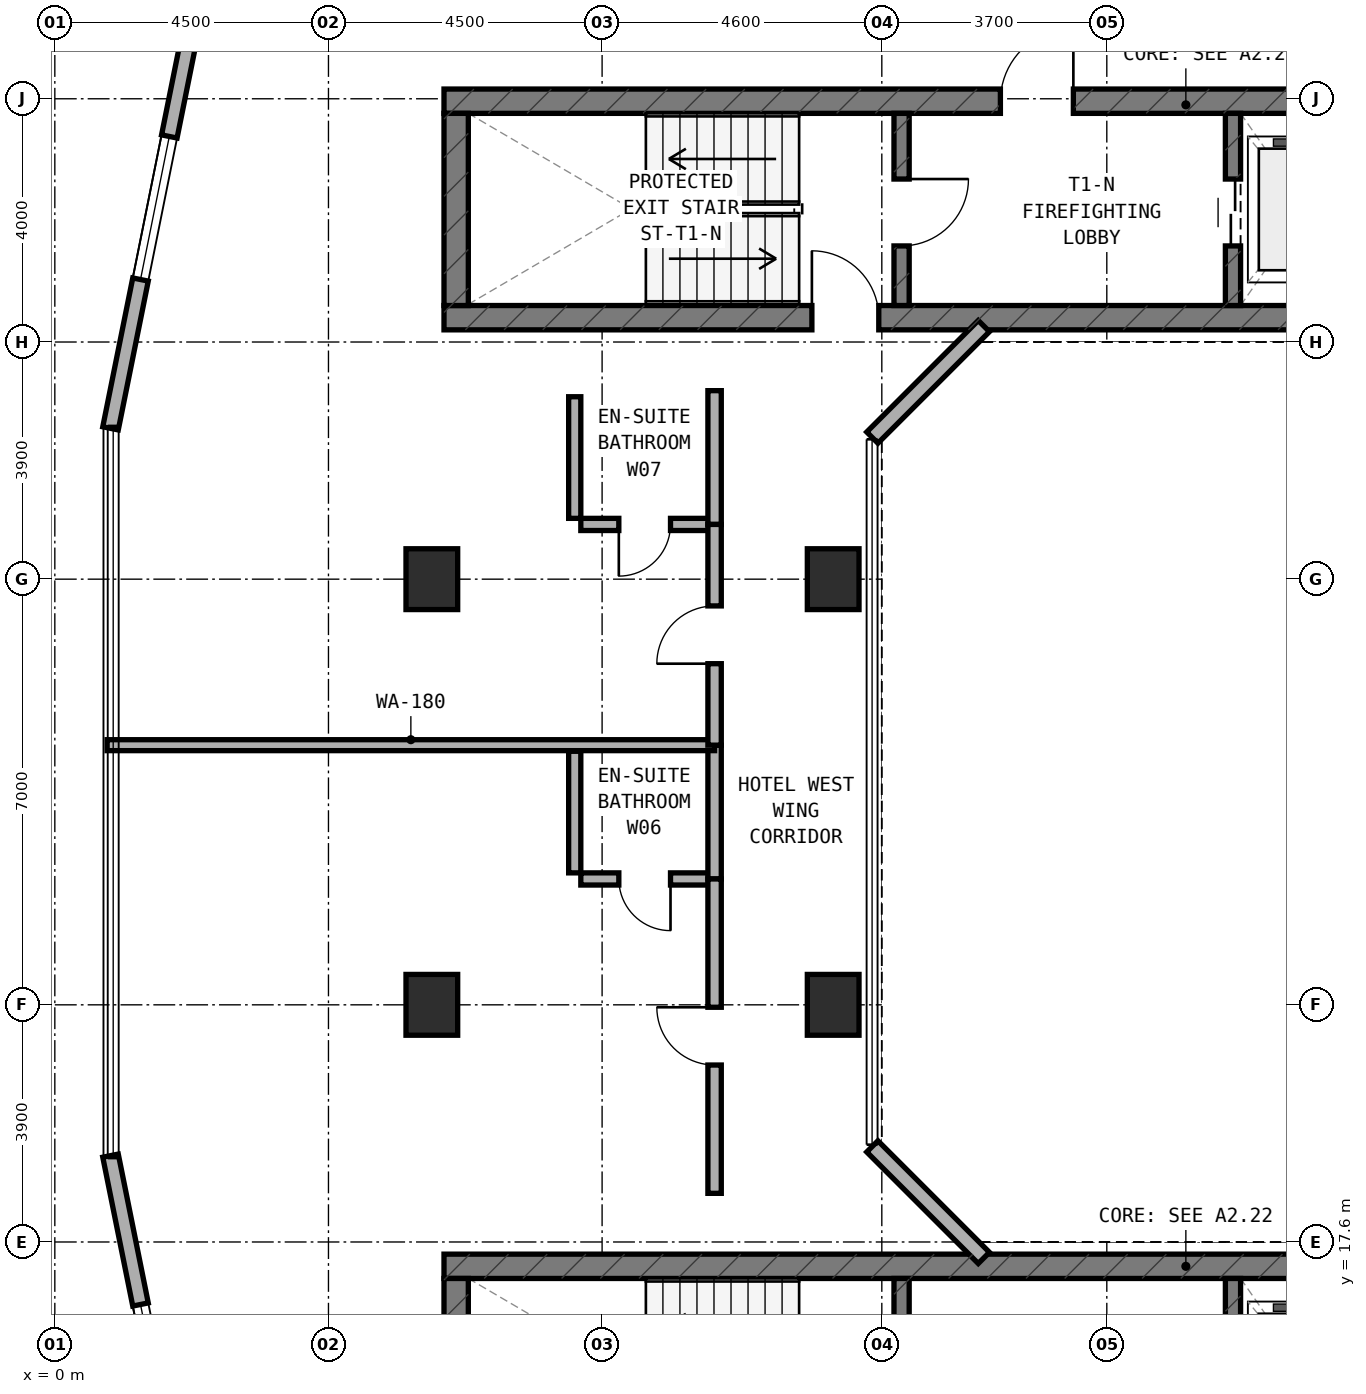
"""IFC4 building model, lengths in metres.
Left out: names, types, materials, properties, quantities, classifications, styles, units other than length and angle.
Written with IfcOpenShell. Run it as: python <this file> out.ifc"""

import sys

from ifc_helpers import new_model, si_unit, direction, frame, frame_2d, origin, origin_2d, place, context, subcontext, project, spatial, rectangle, extrude, element, fill, save


model = new_model("IFC4")
c1 = context("Model", 3, precision=1e-05, world=origin(), true_north=direction((0.0, 1.0)))
c2 = subcontext(c1, "Body", "Model", "MODEL_VIEW")
j1 = project(units=[si_unit("LENGTHUNIT", "METRE"), si_unit("PLANEANGLEUNIT", "RADIAN")], contexts=[c1])
p1 = place(None, origin())
s1 = spatial("IfcSite", under=j1, at=p1, CompositionType="ELEMENT")
p2 = place(p1, origin())
s2 = spatial("IfcBuilding", under=s1, at=p2, CompositionType="ELEMENT")
p3 = place(p2, frame((0.0, 0.0, 95.0)))
s3 = spatial("IfcBuildingStorey", under=s2, at=p3, CompositionType="ELEMENT", Elevation=95.0)
p4 = place(p3, frame((6.4, 32.8, 0.0), z_axis=(0.0, 0.0, 1.0), x_axis=(1.0, 0.0, 0.0)))
e1 = element("IfcWall", 1, at=p4, inside=s3, PredefinedType="SHEAR", context=c2, shape_type="SweptSolid", body=[
    extrude(rectangle(XDim=24.4, YDim=0.4, at=frame_2d((12.2, 0.0))), origin(), (0.0, 0.0, 1.0), 3.5),
])
p5 = place(p4, frame((6.05, 0.0, 0.0)))
e2 = element("IfcOpeningElement", 2, at=p5, cuts=e1, PredefinedType="OPENING", context=c2, shape_type="SweptSolid", body=[
    extrude(rectangle(XDim=1.1, YDim=2.15, at=frame_2d((0.55, 1.075))), frame((0.0, 0.21, 0.0), z_axis=(0.0, -1.0, 0.0), x_axis=(1.0, 0.0, 0.0)), (0.0, 0.0, 1.0), 0.42),
])
p6 = place(p3, frame((6.4, 36.36, 0.0), z_axis=(0.0, 0.0, 1.0), x_axis=(1.0, 0.0, 0.0)))
e3 = element("IfcWall", 3, at=p6, inside=s3, PredefinedType="SHEAR", context=c2, shape_type="SweptSolid", body=[
    extrude(rectangle(XDim=24.4, YDim=0.4, at=frame_2d((12.2, 0.0))), origin(), (0.0, 0.0, 1.0), 3.5),
])
p7 = place(p6, frame((9.15, 0.0, 0.0)))
e4 = element("IfcOpeningElement", 4, at=p7, cuts=e3, PredefinedType="OPENING", context=c2, shape_type="SweptSolid", body=[
    extrude(rectangle(XDim=1.2, YDim=2.15, at=frame_2d((0.6, 1.075))), frame((0.0, 0.21, 0.0), z_axis=(0.0, -1.0, 0.0), x_axis=(1.0, 0.0, 0.0)), (0.0, 0.0, 1.0), 0.42),
])
p8 = place(p6, frame((16.94, 0.0, 0.0)))
e5 = element("IfcOpeningElement", 5, at=p8, cuts=e3, PredefinedType="OPENING", context=c2, shape_type="SweptSolid", body=[
    extrude(rectangle(XDim=0.85, YDim=2.1, at=frame_2d((0.425, 1.05))), frame((0.0, 0.21, 0.0), z_axis=(0.0, -1.0, 0.0), x_axis=(1.0, 0.0, 0.0)), (0.0, 0.0, 1.0), 0.42),
])
p9 = place(p6, frame((18.783, 0.0, 0.0)))
e6 = element("IfcOpeningElement", 6, at=p9, cuts=e3, PredefinedType="OPENING", context=c2, shape_type="SweptSolid", body=[
    extrude(rectangle(XDim=1.1, YDim=2.15, at=frame_2d((0.55, 1.075))), frame((0.0, 0.21, 0.0), z_axis=(0.0, -1.0, 0.0), x_axis=(1.0, 0.0, 0.0)), (0.0, 0.0, 1.0), 0.42),
])
p10 = place(p6, frame((20.65, 0.0, 0.0)))
e7 = element("IfcOpeningElement", 7, at=p10, cuts=e3, PredefinedType="OPENING", context=c2, shape_type="SweptSolid", body=[
    extrude(rectangle(XDim=1.1, YDim=2.15, at=frame_2d((0.55, 1.075))), frame((0.0, 0.21, 0.0), z_axis=(0.0, -1.0, 0.0), x_axis=(1.0, 0.0, 0.0)), (0.0, 0.0, 1.0), 0.42),
])
p11 = place(p6, frame((22.517, 0.0, 0.0)))
e8 = element("IfcOpeningElement", 8, at=p11, cuts=e3, PredefinedType="OPENING", context=c2, shape_type="SweptSolid", body=[
    extrude(rectangle(XDim=1.1, YDim=2.15, at=frame_2d((0.55, 1.075))), frame((0.0, 0.21, 0.0), z_axis=(0.0, -1.0, 0.0), x_axis=(1.0, 0.0, 0.0)), (0.0, 0.0, 1.0), 0.42),
])
p12 = place(p3, frame((6.6, 33.0, 0.0), z_axis=(0.0, 0.0, 1.0), x_axis=(0.0, 1.0, 0.0)))
e9 = element("IfcWall", 9, at=p12, inside=s3, PredefinedType="SHEAR", context=c2, shape_type="SweptSolid", body=[
    extrude(rectangle(XDim=3.16, YDim=0.4, at=frame_2d((1.58, 0.0))), origin(), (0.0, 0.0, 1.0), 3.5),
])
p13 = place(p3, frame((13.925, 33.0, 0.0), z_axis=(0.0, 0.0, 1.0), x_axis=(0.0, 1.0, 0.0)))
e10 = element("IfcWall", 10, at=p13, inside=s3, PredefinedType="STANDARD", context=c2, shape_type="SweptSolid", body=[
    extrude(rectangle(XDim=3.16, YDim=0.25, at=frame_2d((1.58, 0.0))), origin(), (0.0, 0.0, 1.0), 3.22),
])
p14 = place(p13, frame((0.98, 0.0, 0.0)))
e11 = element("IfcOpeningElement", 11, at=p14, cuts=e10, PredefinedType="OPENING", context=c2, shape_type="SweptSolid", body=[
    extrude(rectangle(XDim=1.1, YDim=2.15, at=frame_2d((0.55, 1.075))), frame((0.0, 0.135, 0.0), z_axis=(0.0, -1.0, 0.0), x_axis=(1.0, 0.0, 0.0)), (0.0, 0.0, 1.0), 0.27),
])
p15 = place(p3, frame((19.375, 33.0, 0.0), z_axis=(0.0, 0.0, 1.0), x_axis=(0.0, 1.0, 0.0)))
e12 = element("IfcWall", 12, at=p15, inside=s3, PredefinedType="STANDARD", context=c2, shape_type="SweptSolid", body=[
    extrude(rectangle(XDim=3.16, YDim=0.25, at=frame_2d((1.58, 0.0))), origin(), (0.0, 0.0, 1.0), 3.22),
])
p16 = place(p15, frame((0.98, 0.0, 0.0)))
e13 = element("IfcOpeningElement", 13, at=p16, cuts=e12, PredefinedType="OPENING", context=c2, shape_type="SweptSolid", body=[
    extrude(rectangle(XDim=1.1, YDim=2.15, at=frame_2d((0.55, 1.075))), frame((0.0, 0.135, 0.0), z_axis=(0.0, -1.0, 0.0), x_axis=(1.0, 0.0, 0.0)), (0.0, 0.0, 1.0), 0.27),
])
p17 = place(p3, frame((6.4, 17.2, 0.0), z_axis=(0.0, 0.0, 1.0), x_axis=(1.0, 0.0, 0.0)))
e14 = element("IfcWall", 14, at=p17, inside=s3, PredefinedType="SHEAR", context=c2, shape_type="SweptSolid", body=[
    extrude(rectangle(XDim=24.4, YDim=0.4, at=frame_2d((12.2, 0.0))), origin(), (0.0, 0.0, 1.0), 3.5),
])
p18 = place(p3, frame((6.6, 13.84, 0.0), z_axis=(0.0, 0.0, 1.0), x_axis=(0.0, 1.0, 0.0)))
e15 = element("IfcWall", 15, at=p18, inside=s3, PredefinedType="SHEAR", context=c2, shape_type="SweptSolid", body=[
    extrude(rectangle(XDim=3.16, YDim=0.4, at=frame_2d((1.58, 0.0))), origin(), (0.0, 0.0, 1.0), 3.5),
])
p19 = place(p3, frame((13.925, 13.84, 0.0), z_axis=(0.0, 0.0, 1.0), x_axis=(0.0, 1.0, 0.0)))
e16 = element("IfcWall", 16, at=p19, inside=s3, PredefinedType="STANDARD", context=c2, shape_type="SweptSolid", body=[
    extrude(rectangle(XDim=3.16, YDim=0.25, at=frame_2d((1.58, 0.0))), origin(), (0.0, 0.0, 1.0), 3.22),
])
p20 = place(p19, frame((0.98, 0.0, 0.0)))
e17 = element("IfcOpeningElement", 17, at=p20, cuts=e16, PredefinedType="OPENING", context=c2, shape_type="SweptSolid", body=[
    extrude(rectangle(XDim=1.1, YDim=2.15, at=frame_2d((0.55, 1.075))), frame((0.0, 0.135, 0.0), z_axis=(0.0, -1.0, 0.0), x_axis=(1.0, 0.0, 0.0)), (0.0, 0.0, 1.0), 0.27),
])
p21 = place(p3, frame((19.375, 13.84, 0.0), z_axis=(0.0, 0.0, 1.0), x_axis=(0.0, 1.0, 0.0)))
e18 = element("IfcWall", 18, at=p21, inside=s3, PredefinedType="STANDARD", context=c2, shape_type="SweptSolid", body=[
    extrude(rectangle(XDim=3.16, YDim=0.25, at=frame_2d((1.58, 0.0))), origin(), (0.0, 0.0, 1.0), 3.22),
])
p22 = place(p21, frame((0.98, 0.0, 0.0)))
e19 = element("IfcOpeningElement", 19, at=p22, cuts=e18, PredefinedType="OPENING", context=c2, shape_type="SweptSolid", body=[
    extrude(rectangle(XDim=1.1, YDim=2.15, at=frame_2d((0.55, 1.075))), frame((0.0, 0.135, 0.0), z_axis=(0.0, -1.0, 0.0), x_axis=(1.0, 0.0, 0.0)), (0.0, 0.0, 1.0), 0.27),
])
for number, where, z_axis, x_axis in (
    (20, (6.2, 21.5, 0.0), (0.0, 0.0, 1.0), (1.0, 0.0, 0.0)),
    (21, (6.2, 28.5, 0.0), (0.0, 0.0, 1.0), (1.0, 0.0, 0.0)),
    (22, (12.8, 21.5, 0.0), (0.0, 0.0, 1.0), (1.0, 0.0, 0.0)),
    (23, (12.8, 28.5, 0.0), (0.0, 0.0, 1.0), (1.0, 0.0, 0.0)),
):
    element("IfcColumn", number, at=place(p3, frame(where, z_axis=z_axis, x_axis=x_axis)), inside=s3, PredefinedType="COLUMN", context=c2, shape_type="SweptSolid", body=[
        extrude(rectangle(XDim=0.85, YDim=1.0, at=origin_2d()), origin(), (0.0, 0.0, 1.0), 3.5),
    ])
p23 = place(p3, frame((2.729, 39.982, 0.0), z_axis=(0.0, 0.0, 1.0), x_axis=(-0.197435082048, -0.980315963543, 0.0)))
e24 = element("IfcWall", 24, at=p23, inside=s3, PredefinedType="STANDARD", context=c2, shape_type="SweptSolid", body=[
    extrude(rectangle(XDim=9.183, YDim=0.26, at=frame_2d((4.591, 0.0))), origin(), (0.0, 0.0, 1.0), 3.22),
])
p24 = place(p23, frame((4.286, 0.0, 0.8)))
e25 = element("IfcOpeningElement", 25, at=p24, cuts=e24, PredefinedType="OPENING", context=c2, shape_type="SweptSolid", body=[
    extrude(rectangle(XDim=2.4, YDim=1.6, at=frame_2d((1.2, 0.8))), frame((0.0, 0.14, 0.0), z_axis=(0.0, -1.0, 0.0), x_axis=(1.0, 0.0, 0.0)), (0.0, 0.0, 1.0), 0.28),
])
p25 = place(p3, frame((0.916, 19.02, 0.0), z_axis=(0.0, 0.0, 1.0), x_axis=(0.197435082048, -0.980315963543, 0.0)))
e26 = element("IfcWall", 26, at=p25, inside=s3, PredefinedType="STANDARD", context=c2, shape_type="SweptSolid", body=[
    extrude(rectangle(XDim=9.183, YDim=0.26, at=frame_2d((4.591, 0.0))), origin(), (0.0, 0.0, 1.0), 3.22),
])
p26 = place(p25, frame((2.497, 0.0, 0.8)))
e27 = element("IfcOpeningElement", 27, at=p26, cuts=e26, PredefinedType="OPENING", context=c2, shape_type="SweptSolid", body=[
    extrude(rectangle(XDim=2.4, YDim=1.6, at=frame_2d((1.2, 0.8))), frame((0.0, 0.14, 0.0), z_axis=(0.0, -1.0, 0.0), x_axis=(1.0, 0.0, 0.0)), (0.0, 0.0, 1.0), 0.28),
])
for number, where, z_axis, x_axis in (
    (28, (15.278, 32.662, 0.0), (0.0, 0.0, 1.0), (-0.707, -0.707, 0.0)),
    (29, (13.444, 19.172, 0.0), (0.0, 0.0, 1.0), (0.707, -0.707, 0.0)),
):
    element("IfcWall", number, at=place(p3, frame(where, z_axis=z_axis, x_axis=x_axis)), inside=s3, PredefinedType="STANDARD", context=c2, shape_type="SweptSolid", body=[
        extrude(rectangle(XDim=2.594, YDim=0.26, at=frame_2d((1.297, 0.0))), origin(), (0.0, 0.0, 1.0), 3.22),
    ])
p27 = place(p3, frame((8.65, 23.57, 0.0), z_axis=(0.0, 0.0, 1.0), x_axis=(1.0, 0.0, 0.0)))
e30 = element("IfcWall", 30, at=p27, inside=s3, PredefinedType="PLUMBINGWALL", context=c2, shape_type="SweptSolid", body=[
    extrude(rectangle(XDim=2.1, YDim=0.2, at=frame_2d((1.05, 0.0))), origin(), (0.0, 0.0, 1.0), 3.22),
])
p28 = place(p27, frame((0.625, 0.0, 0.0)))
e31 = element("IfcOpeningElement", 31, at=p28, cuts=e30, PredefinedType="OPENING", context=c2, shape_type="SweptSolid", body=[
    extrude(rectangle(XDim=0.85, YDim=2.1, at=frame_2d((0.425, 1.05))), frame((0.0, 0.11, 0.0), z_axis=(0.0, -1.0, 0.0), x_axis=(1.0, 0.0, 0.0)), (0.0, 0.0, 1.0), 0.22),
])
p29 = place(p3, frame((8.55, 23.67, 0.0), z_axis=(0.0, 0.0, 1.0), x_axis=(0.0, 1.0, 0.0)))
e32 = element("IfcWall", 32, at=p29, inside=s3, PredefinedType="PLUMBINGWALL", context=c2, shape_type="SweptSolid", body=[
    extrude(rectangle(XDim=2.0, YDim=0.2, at=frame_2d((1.0, 0.0))), origin(), (0.0, 0.0, 1.0), 3.22),
])
p30 = place(p3, frame((10.85, 23.57, 0.0), z_axis=(0.0, 0.0, 1.0), x_axis=(0.0, 1.0, 0.0)))
e33 = element("IfcWall", 33, at=p30, inside=s3, PredefinedType="SOLIDWALL", context=c2, shape_type="SweptSolid", body=[
    extrude(rectangle(XDim=2.2, YDim=0.22, at=frame_2d((1.1, 0.0))), origin(), (0.0, 0.0, 1.0), 3.22),
])
p31 = place(p3, frame((10.85, 18.4, 0.0), z_axis=(0.0, 0.0, 1.0), x_axis=(0.0, 1.0, 0.0)))
e34 = element("IfcWall", 34, at=p31, inside=s3, PredefinedType="SOLIDWALL", context=c2, shape_type="SweptSolid", body=[
    extrude(rectangle(XDim=5.17, YDim=0.22, at=frame_2d((2.585, 0.0))), origin(), (0.0, 0.0, 1.0), 2.595),
])
p32 = place(p31, frame((2.11, 0.0, 0.0)))
e35 = element("IfcOpeningElement", 35, at=p32, cuts=e34, PredefinedType="OPENING", context=c2, shape_type="SweptSolid", body=[
    extrude(rectangle(XDim=0.95, YDim=2.1, at=frame_2d((0.475, 1.05))), frame((0.0, 0.12, 0.0), z_axis=(0.0, -1.0, 0.0), x_axis=(1.0, 0.0, 0.0)), (0.0, 0.0, 1.0), 0.24),
])
p33 = place(p3, frame((0.86, 25.77, 0.0), z_axis=(0.0, 0.0, 1.0), x_axis=(1.0, 0.0, 0.0)))
e36 = element("IfcWall", 36, at=p33, inside=s3, PredefinedType="SOLIDWALL", context=c2, shape_type="SweptSolid", body=[
    extrude(rectangle(XDim=9.99, YDim=0.18, at=frame_2d((4.995, 0.0))), origin(), (0.0, 0.0, 1.0), 2.835),
])
p34 = place(p3, frame((8.65, 29.4, 0.0), z_axis=(0.0, 0.0, 1.0), x_axis=(1.0, 0.0, 0.0)))
e37 = element("IfcWall", 37, at=p34, inside=s3, PredefinedType="PLUMBINGWALL", context=c2, shape_type="SweptSolid", body=[
    extrude(rectangle(XDim=2.1, YDim=0.2, at=frame_2d((1.05, 0.0))), origin(), (0.0, 0.0, 1.0), 3.22),
])
p35 = place(p34, frame((0.625, 0.0, 0.0)))
e38 = element("IfcOpeningElement", 38, at=p35, cuts=e37, PredefinedType="OPENING", context=c2, shape_type="SweptSolid", body=[
    extrude(rectangle(XDim=0.85, YDim=2.1, at=frame_2d((0.425, 1.05))), frame((0.0, 0.11, 0.0), z_axis=(0.0, -1.0, 0.0), x_axis=(1.0, 0.0, 0.0)), (0.0, 0.0, 1.0), 0.22),
])
p36 = place(p3, frame((8.55, 29.5, 0.0), z_axis=(0.0, 0.0, 1.0), x_axis=(0.0, 1.0, 0.0)))
e39 = element("IfcWall", 39, at=p36, inside=s3, PredefinedType="PLUMBINGWALL", context=c2, shape_type="SweptSolid", body=[
    extrude(rectangle(XDim=2.0, YDim=0.2, at=frame_2d((1.0, 0.0))), origin(), (0.0, 0.0, 1.0), 3.22),
])
p37 = place(p3, frame((10.85, 29.4, 0.0), z_axis=(0.0, 0.0, 1.0), x_axis=(0.0, 1.0, 0.0)))
e40 = element("IfcWall", 40, at=p37, inside=s3, PredefinedType="SOLIDWALL", context=c2, shape_type="SweptSolid", body=[
    extrude(rectangle(XDim=2.2, YDim=0.22, at=frame_2d((1.1, 0.0))), origin(), (0.0, 0.0, 1.0), 3.22),
])
p38 = place(p3, frame((10.85, 25.77, 0.0), z_axis=(0.0, 0.0, 1.0), x_axis=(0.0, 1.0, 0.0)))
e41 = element("IfcWall", 41, at=p38, inside=s3, PredefinedType="SOLIDWALL", context=c2, shape_type="SweptSolid", body=[
    extrude(rectangle(XDim=3.63, YDim=0.22, at=frame_2d((1.815, 0.0))), origin(), (0.0, 0.0, 1.0), 2.595),
])
p39 = place(p38, frame((1.34, 0.0, 0.0)))
e42 = element("IfcOpeningElement", 42, at=p39, cuts=e41, PredefinedType="OPENING", context=c2, shape_type="SweptSolid", body=[
    extrude(rectangle(XDim=0.95, YDim=2.1, at=frame_2d((0.475, 1.05))), frame((0.0, 0.12, 0.0), z_axis=(0.0, -1.0, 0.0), x_axis=(1.0, 0.0, 0.0)), (0.0, 0.0, 1.0), 0.24),
])
p40 = place(p24, origin())
e43 = element("IfcWindow", 43, at=p40, inside=s3, PartitioningType="SINGLE_PANEL", PredefinedType="WINDOW", context=c2, shape_type="SweptSolid", body=[
    extrude(rectangle(XDim=2.4, YDim=1.6, at=frame_2d((1.2, 0.8))), frame((0.0, 0.03, 0.0), z_axis=(0.0, -1.0, 0.0), x_axis=(1.0, 0.0, 0.0)), (0.0, 0.0, 1.0), 0.06),
])
fill(e25, e43)
p41 = place(p26, origin())
e44 = element("IfcWindow", 44, at=p41, inside=s3, PartitioningType="SINGLE_PANEL", PredefinedType="WINDOW", context=c2, shape_type="SweptSolid", body=[
    extrude(rectangle(XDim=2.4, YDim=1.6, at=frame_2d((1.2, 0.8))), frame((0.0, 0.03, 0.0), z_axis=(0.0, -1.0, 0.0), x_axis=(1.0, 0.0, 0.0)), (0.0, 0.0, 1.0), 0.06),
])
fill(e27, e44)
p42 = place(p14, frame((1.1, 0.0, 0.0), z_axis=(0.0, 0.0, 1.0), x_axis=(-1.0, 0.0, 0.0)))
e45 = element("IfcDoor", 45, at=p42, inside=s3, OperationType="SINGLE_SWING_LEFT", PredefinedType="DOOR", context=c2, shape_type="SweptSolid", body=[
    extrude(rectangle(XDim=1.1, YDim=2.15, at=frame_2d((0.55, 1.075))), frame((0.0, 0.025, 0.0), z_axis=(0.0, -1.0, 0.0), x_axis=(1.0, 0.0, 0.0)), (0.0, 0.0, 1.0), 0.05),
])
fill(e11, e45)
p43 = place(p7, origin())
e46 = element("IfcDoor", 46, at=p43, inside=s3, OperationType="SINGLE_SWING_RIGHT", PredefinedType="DOOR", context=c2, shape_type="SweptSolid", body=[
    extrude(rectangle(XDim=1.2, YDim=2.15, at=frame_2d((0.6, 1.075))), frame((0.0, 0.025, 0.0), z_axis=(0.0, -1.0, 0.0), x_axis=(1.0, 0.0, 0.0)), (0.0, 0.0, 1.0), 0.05),
])
fill(e4, e46)
p44 = place(p16, origin())
e47 = element("IfcDoor", 47, at=p44, inside=s3, OperationType="DOUBLE_DOOR_SLIDING", PredefinedType="DOOR", context=c2, shape_type="SweptSolid", body=[
    extrude(rectangle(XDim=1.1, YDim=2.15, at=frame_2d((0.55, 1.075))), frame((0.0, 0.025, 0.0), z_axis=(0.0, -1.0, 0.0), x_axis=(1.0, 0.0, 0.0)), (0.0, 0.0, 1.0), 0.05),
])
fill(e13, e47)
p45 = place(p5, origin())
e48 = element("IfcDoor", 48, at=p45, inside=s3, OperationType="SINGLE_SWING_LEFT", PredefinedType="DOOR", context=c2, shape_type="SweptSolid", body=[
    extrude(rectangle(XDim=1.1, YDim=2.15, at=frame_2d((0.55, 1.075))), frame((0.0, 0.025, 0.0), z_axis=(0.0, -1.0, 0.0), x_axis=(1.0, 0.0, 0.0)), (0.0, 0.0, 1.0), 0.05),
])
fill(e2, e48)
p46 = place(p28, frame((0.85, 0.0, 0.0), z_axis=(0.0, 0.0, 1.0), x_axis=(-1.0, 0.0, 0.0)))
e49 = element("IfcDoor", 49, at=p46, inside=s3, OperationType="SINGLE_SWING_LEFT", PredefinedType="DOOR", context=c2, shape_type="SweptSolid", body=[
    extrude(rectangle(XDim=0.85, YDim=2.1, at=frame_2d((0.425, 1.05))), frame((0.0, 0.025, 0.0), z_axis=(0.0, -1.0, 0.0), x_axis=(1.0, 0.0, 0.0)), (0.0, 0.0, 1.0), 0.05),
])
fill(e31, e49)
p47 = place(p32, origin())
e50 = element("IfcDoor", 50, at=p47, inside=s3, OperationType="SINGLE_SWING_RIGHT", PredefinedType="DOOR", context=c2, shape_type="SweptSolid", body=[
    extrude(rectangle(XDim=0.95, YDim=2.1, at=frame_2d((0.475, 1.05))), frame((0.0, 0.025, 0.0), z_axis=(0.0, -1.0, 0.0), x_axis=(1.0, 0.0, 0.0)), (0.0, 0.0, 1.0), 0.05),
])
fill(e35, e50)
p48 = place(p35, frame((0.85, 0.0, 0.0), z_axis=(0.0, 0.0, 1.0), x_axis=(-1.0, 0.0, 0.0)))
e51 = element("IfcDoor", 51, at=p48, inside=s3, OperationType="SINGLE_SWING_RIGHT", PredefinedType="DOOR", context=c2, shape_type="SweptSolid", body=[
    extrude(rectangle(XDim=0.85, YDim=2.1, at=frame_2d((0.425, 1.05))), frame((0.0, 0.025, 0.0), z_axis=(0.0, -1.0, 0.0), x_axis=(1.0, 0.0, 0.0)), (0.0, 0.0, 1.0), 0.05),
])
fill(e38, e51)
p49 = place(p39, origin())
e52 = element("IfcDoor", 52, at=p49, inside=s3, OperationType="SINGLE_SWING_LEFT", PredefinedType="DOOR", context=c2, shape_type="SweptSolid", body=[
    extrude(rectangle(XDim=0.95, YDim=2.1, at=frame_2d((0.475, 1.05))), frame((0.0, 0.025, 0.0), z_axis=(0.0, -1.0, 0.0), x_axis=(1.0, 0.0, 0.0)), (0.0, 0.0, 1.0), 0.05),
])
fill(e42, e52)
save(model, sys.argv[1])
